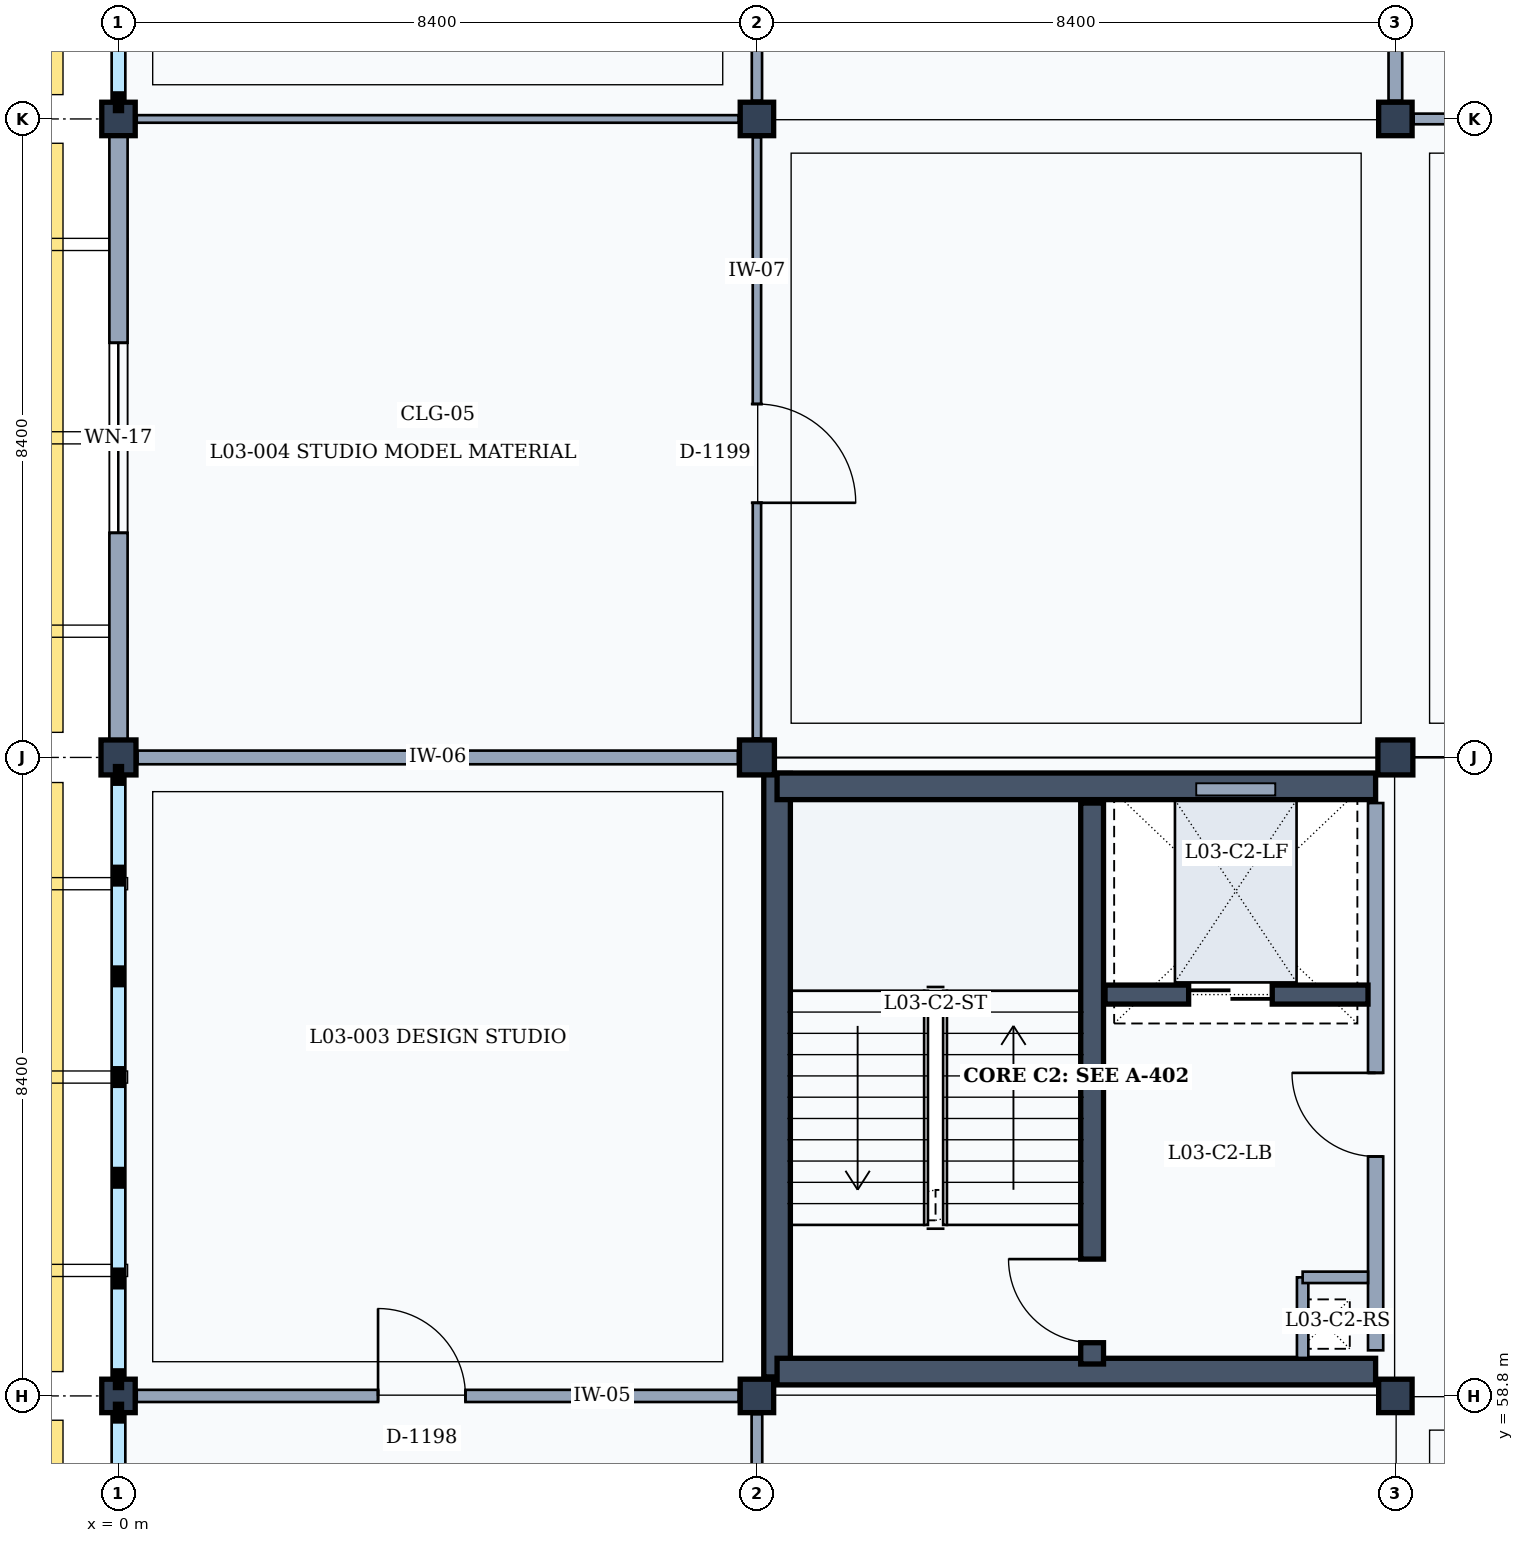
"""IFC4 building model, lengths in metres.
Left out: names, types, materials, properties, quantities, classifications, styles, units other than length and angle.
Written with IfcOpenShell. Run it as: python <this file> out.ifc"""

import sys

from ifc_helpers import new_model, si_unit, direction, frame, frame_2d, origin, origin_2d, place, context, subcontext, project, spatial, rectangle, extrude, element, fill, save


model = new_model("IFC4")
c1 = context("Model", 3, precision=1e-05, world=origin(), true_north=direction((0.0, 1.0)))
c2 = subcontext(c1, "Body", "Model", "MODEL_VIEW")
j1 = project(units=[si_unit("LENGTHUNIT", "METRE"), si_unit("PLANEANGLEUNIT", "RADIAN")], contexts=[c1])
p1 = place(None, origin())
s1 = spatial("IfcSite", under=j1, at=p1, CompositionType="ELEMENT")
p2 = place(p1, origin())
s2 = spatial("IfcBuilding", under=s1, at=p2, CompositionType="ELEMENT")
p3 = place(p2, frame((0.0, 0.0, 13.8)))
s3 = spatial("IfcBuildingStorey", under=s2, at=p3, CompositionType="ELEMENT", Elevation=13.8)
p4 = place(p3, frame((0.0, 58.8, 0.0), z_axis=(0.0, 0.0, 1.0), x_axis=(1.0, 0.0, 0.0)))
e1 = element("IfcColumn", 1, at=p4, inside=s3, PredefinedType="COLUMN", context=c2, shape_type="SweptSolid", body=[
    extrude(rectangle(XDim=0.44, YDim=0.44, at=origin_2d()), origin(), (0.0, 0.0, 1.0), 4.2),
])
p5 = place(p3, frame((0.0, 67.2, 0.0), z_axis=(0.0, 0.0, 1.0), x_axis=(1.0, 0.0, 0.0)))
e2 = element("IfcColumn", 2, at=p5, inside=s3, PredefinedType="COLUMN", context=c2, shape_type="SweptSolid", body=[
    extrude(rectangle(XDim=0.46, YDim=0.46, at=origin_2d()), origin(), (0.0, 0.0, 1.0), 4.2),
])
for number, where, z_axis, x_axis in (
    (3, (0.0, 75.6, 0.0), (0.0, 0.0, 1.0), (1.0, 0.0, 0.0)),
    (4, (8.4, 58.8, 0.0), (0.0, 0.0, 1.0), (1.0, 0.0, 0.0)),
):
    element("IfcColumn", number, at=place(p3, frame(where, z_axis=z_axis, x_axis=x_axis)), inside=s3, PredefinedType="COLUMN", context=c2, shape_type="SweptSolid", body=[
        extrude(rectangle(XDim=0.44, YDim=0.44, at=origin_2d()), origin(), (0.0, 0.0, 1.0), 4.2),
    ])
p6 = place(p3, frame((8.4, 67.2, 0.0), z_axis=(0.0, 0.0, 1.0), x_axis=(1.0, 0.0, 0.0)))
e5 = element("IfcColumn", 5, at=p6, inside=s3, PredefinedType="COLUMN", context=c2, shape_type="SweptSolid", body=[
    extrude(rectangle(XDim=0.46, YDim=0.46, at=origin_2d()), origin(), (0.0, 0.0, 1.0), 4.2),
])
for number, where, z_axis, x_axis in (
    (6, (8.4, 75.6, 0.0), (0.0, 0.0, 1.0), (1.0, 0.0, 0.0)),
    (7, (16.8, 58.8, 0.0), (0.0, 0.0, 1.0), (1.0, 0.0, 0.0)),
):
    element("IfcColumn", number, at=place(p3, frame(where, z_axis=z_axis, x_axis=x_axis)), inside=s3, PredefinedType="COLUMN", context=c2, shape_type="SweptSolid", body=[
        extrude(rectangle(XDim=0.44, YDim=0.44, at=origin_2d()), origin(), (0.0, 0.0, 1.0), 4.2),
    ])
p7 = place(p3, frame((16.8, 67.2, 0.0), z_axis=(0.0, 0.0, 1.0), x_axis=(1.0, 0.0, 0.0)))
e8 = element("IfcColumn", 8, at=p7, inside=s3, PredefinedType="COLUMN", context=c2, shape_type="SweptSolid", body=[
    extrude(rectangle(XDim=0.46, YDim=0.46, at=origin_2d()), origin(), (0.0, 0.0, 1.0), 4.2),
])
p8 = place(p3, frame((16.8, 75.6, 0.0), z_axis=(0.0, 0.0, 1.0), x_axis=(1.0, 0.0, 0.0)))
e9 = element("IfcColumn", 9, at=p8, inside=s3, PredefinedType="COLUMN", context=c2, shape_type="SweptSolid", body=[
    extrude(rectangle(XDim=0.44, YDim=0.44, at=origin_2d()), origin(), (0.0, 0.0, 1.0), 4.2),
])
p9 = place(p3, frame((0.0, 67.43, 0.0), z_axis=(0.0, 0.0, 1.0), x_axis=(0.0, 1.0, 0.0)))
e10 = element("IfcWall", 10, at=p9, inside=s3, PredefinedType="SOLIDWALL", context=c2, shape_type="SweptSolid", body=[
    extrude(rectangle(XDim=7.95, YDim=0.24, at=frame_2d((3.975, 0.0))), origin(), (0.0, 0.0, 1.0), 3.36),
])
p10 = place(p9, frame((2.725, 0.0, 0.9)))
e11 = element("IfcOpeningElement", 11, at=p10, cuts=e10, PredefinedType="OPENING", context=c2, shape_type="SweptSolid", body=[
    extrude(rectangle(XDim=2.5, YDim=2.0, at=frame_2d((1.25, 1.0))), frame((0.0, 0.13, 0.0), z_axis=(0.0, -1.0, 0.0), x_axis=(1.0, 0.0, 0.0)), (0.0, 0.0, 1.0), 0.26),
])
p11 = place(p3, frame((8.665, 59.05, 0.0), z_axis=(0.0, 0.0, 1.0), x_axis=(0.0, 1.0, 0.0)))
e12 = element("IfcWall", 12, at=p11, inside=s3, PredefinedType="SHEAR", context=c2, shape_type="SweptSolid", body=[
    extrude(rectangle(XDim=7.94, YDim=0.35, at=frame_2d((3.97, 0.0))), origin(), (0.0, 0.0, 1.0), 3.98),
])
p12 = place(p3, frame((8.665, 66.82, 0.0), z_axis=(0.0, 0.0, 1.0), x_axis=(1.0, 0.0, 0.0)))
e13 = element("IfcWall", 13, at=p12, inside=s3, PredefinedType="SHEAR", context=c2, shape_type="SweptSolid", body=[
    extrude(rectangle(XDim=7.875, YDim=0.35, at=frame_2d((3.938, 0.0))), origin(), (0.0, 0.0, 1.0), 3.98),
])
p13 = place(p3, frame((16.54, 66.6, 0.0), z_axis=(0.0, 0.0, 1.0), x_axis=(0.0, -1.0, 0.0)))
e14 = element("IfcWall", 14, at=p13, inside=s3, PredefinedType="PARTITIONING", context=c2, shape_type="SweptSolid", body=[
    extrude(rectangle(XDim=7.2, YDim=0.2, at=frame_2d((3.6, 0.0))), origin(), (0.0, 0.0, 1.0), 3.32),
])
p14 = place(p13, frame((3.55, 0.0, 0.0)))
e15 = element("IfcOpeningElement", 15, at=p14, cuts=e14, PredefinedType="OPENING", context=c2, shape_type="SweptSolid", body=[
    extrude(rectangle(XDim=1.1, YDim=2.15, at=frame_2d((0.55, 1.075))), frame((0.0, 0.11, 0.0), z_axis=(0.0, -1.0, 0.0), x_axis=(1.0, 0.0, 0.0)), (0.0, 0.0, 1.0), 0.22),
])
p15 = place(p3, frame((16.54, 59.12, 0.0), z_axis=(0.0, 0.0, 1.0), x_axis=(-1.0, 0.0, 0.0)))
e16 = element("IfcWall", 16, at=p15, inside=s3, PredefinedType="SHEAR", context=c2, shape_type="SweptSolid", body=[
    extrude(rectangle(XDim=7.875, YDim=0.35, at=frame_2d((3.938, 0.0))), origin(), (0.0, 0.0, 1.0), 3.98),
])
p16 = place(p3, frame((12.81, 59.22, 0.0), z_axis=(0.0, 0.0, 1.0), x_axis=(0.0, 1.0, 0.0)))
e17 = element("IfcWall", 17, at=p16, inside=s3, PredefinedType="SHEAR", context=c2, shape_type="SweptSolid", body=[
    extrude(rectangle(XDim=7.38, YDim=0.3, at=frame_2d((3.69, 0.0))), origin(), (0.0, 0.0, 1.0), 3.98),
])
p17 = place(p16, frame((0.28, 0.0, 0.0)))
e18 = element("IfcOpeningElement", 18, at=p17, cuts=e17, PredefinedType="OPENING", context=c2, shape_type="SweptSolid", body=[
    extrude(rectangle(XDim=1.1, YDim=2.15, at=frame_2d((0.55, 1.075))), frame((0.0, 0.16, 0.0), z_axis=(0.0, -1.0, 0.0), x_axis=(1.0, 0.0, 0.0)), (0.0, 0.0, 1.0), 0.32),
])
p18 = place(p3, frame((15.58, 60.36, 0.0), z_axis=(0.0, 0.0, 1.0), x_axis=(0.0, -1.0, 0.0)))
e19 = element("IfcWall", 19, at=p18, inside=s3, PredefinedType="PARTITIONING", context=c2, shape_type="SweptSolid", body=[
    extrude(rectangle(XDim=1.06, YDim=0.15, at=frame_2d((0.53, 0.0))), origin(), (0.0, 0.0, 1.0), 3.32),
])
p19 = place(p3, frame((15.58, 60.36, 0.0), z_axis=(0.0, 0.0, 1.0), x_axis=(1.0, 0.0, 0.0)))
e20 = element("IfcWall", 20, at=p19, inside=s3, PredefinedType="PARTITIONING", context=c2, shape_type="SweptSolid", body=[
    extrude(rectangle(XDim=0.86, YDim=0.15, at=frame_2d((0.43, 0.0))), origin(), (0.0, 0.0, 1.0), 3.32),
])
p20 = place(p3, frame((12.98, 64.08, 0.0), z_axis=(0.0, 0.0, 1.0), x_axis=(1.0, 0.0, 0.0)))
e21 = element("IfcWall", 21, at=p20, inside=s3, PredefinedType="SHEAR", context=c2, shape_type="SweptSolid", body=[
    extrude(rectangle(XDim=3.46, YDim=0.25, at=frame_2d((1.73, 0.0))), origin(), (0.0, 0.0, 1.0), 3.98),
])
p21 = place(p20, frame((1.1, 0.0, 0.0)))
e22 = element("IfcOpeningElement", 22, at=p21, cuts=e21, PredefinedType="OPENING", context=c2, shape_type="SweptSolid", body=[
    extrude(rectangle(XDim=1.1, YDim=2.15, at=frame_2d((0.55, 1.075))), frame((0.0, 0.135, 0.0), z_axis=(0.0, -1.0, 0.0), x_axis=(1.0, 0.0, 0.0)), (0.0, 0.0, 1.0), 0.27),
])
p22 = place(p3, frame((8.4, 50.65, 0.0), z_axis=(0.0, 0.0, 1.0), x_axis=(0.0, 1.0, 0.0)))
e23 = element("IfcWall", 23, at=p22, inside=s3, PredefinedType="PARTITIONING", context=c2, shape_type="SweptSolid", body=[
    extrude(rectangle(XDim=7.91, YDim=0.14, at=frame_2d((3.955, 0.0))), origin(), (0.0, 0.0, 1.0), 3.32),
])
p23 = place(p22, frame((3.225, 0.0, 0.0)))
e24 = element("IfcOpeningElement", 24, at=p23, cuts=e23, PredefinedType="OPENING", context=c2, shape_type="SweptSolid", body=[
    extrude(rectangle(XDim=1.05, YDim=2.2, at=frame_2d((0.525, 1.1))), frame((0.0, 0.08, 0.0), z_axis=(0.0, -1.0, 0.0), x_axis=(1.0, 0.0, 0.0)), (0.0, 0.0, 1.0), 0.16),
])
p24 = place(p3, frame((0.24, 58.8, 0.0), z_axis=(0.0, 0.0, 1.0), x_axis=(1.0, 0.0, 0.0)))
e25 = element("IfcWall", 25, at=p24, inside=s3, PredefinedType="PARTITIONING", context=c2, shape_type="SweptSolid", body=[
    extrude(rectangle(XDim=7.92, YDim=0.16, at=frame_2d((3.96, 0.0))), origin(), (0.0, 0.0, 1.0), 3.32),
])
p25 = place(p24, frame((3.175, 0.0, 0.0)))
e26 = element("IfcOpeningElement", 26, at=p25, cuts=e25, PredefinedType="OPENING", context=c2, shape_type="SweptSolid", body=[
    extrude(rectangle(XDim=1.15, YDim=2.25, at=frame_2d((0.575, 1.125))), frame((0.0, 0.09, 0.0), z_axis=(0.0, -1.0, 0.0), x_axis=(1.0, 0.0, 0.0)), (0.0, 0.0, 1.0), 0.18),
])
p26 = place(p3, frame((0.25, 67.2, 0.0), z_axis=(0.0, 0.0, 1.0), x_axis=(1.0, 0.0, 0.0)))
e27 = element("IfcWall", 27, at=p26, inside=s3, PredefinedType="PARTITIONING", context=c2, shape_type="SweptSolid", body=[
    extrude(rectangle(XDim=7.9, YDim=0.18, at=frame_2d((3.95, 0.0))), origin(), (0.0, 0.0, 1.0), 3.32),
])
p27 = place(p3, frame((8.4, 67.45, 0.0), z_axis=(0.0, 0.0, 1.0), x_axis=(0.0, 1.0, 0.0)))
e28 = element("IfcWall", 28, at=p27, inside=s3, PredefinedType="PARTITIONING", context=c2, shape_type="SweptSolid", body=[
    extrude(rectangle(XDim=7.91, YDim=0.11, at=frame_2d((3.955, 0.0))), origin(), (0.0, 0.0, 1.0), 3.32),
])
p28 = place(p27, frame((3.1, 0.0, 0.0)))
e29 = element("IfcOpeningElement", 29, at=p28, cuts=e28, PredefinedType="OPENING", context=c2, shape_type="SweptSolid", body=[
    extrude(rectangle(XDim=1.3, YDim=2.2, at=frame_2d((0.65, 1.1))), frame((0.0, 0.065, 0.0), z_axis=(0.0, -1.0, 0.0), x_axis=(1.0, 0.0, 0.0)), (0.0, 0.0, 1.0), 0.13),
])
p29 = place(p3, frame((0.24, 75.6, 0.0), z_axis=(0.0, 0.0, 1.0), x_axis=(1.0, 0.0, 0.0)))
e30 = element("IfcWall", 30, at=p29, inside=s3, PredefinedType="MOVABLE", context=c2, shape_type="SweptSolid", body=[
    extrude(rectangle(XDim=7.92, YDim=0.1, at=frame_2d((3.96, 0.0))), origin(), (0.0, 0.0, 1.0), 3.32),
])
p30 = place(p3, frame((8.4, 75.84, 0.0), z_axis=(0.0, 0.0, 1.0), x_axis=(0.0, 1.0, 0.0)))
e31 = element("IfcWall", 31, at=p30, inside=s3, PredefinedType="PARTITIONING", context=c2, shape_type="SweptSolid", body=[
    extrude(rectangle(XDim=7.91, YDim=0.135, at=frame_2d((3.955, 0.0))), origin(), (0.0, 0.0, 1.0), 3.32),
])
p31 = place(p30, frame((2.975, 0.0, 0.0)))
e32 = element("IfcOpeningElement", 32, at=p31, cuts=e31, PredefinedType="OPENING", context=c2, shape_type="SweptSolid", body=[
    extrude(rectangle(XDim=1.55, YDim=2.35, at=frame_2d((0.775, 1.175))), frame((0.0, 0.077, 0.0), z_axis=(0.0, -1.0, 0.0), x_axis=(1.0, 0.0, 0.0)), (0.0, 0.0, 1.0), 0.155),
])
p32 = place(p3, frame((16.8, 75.84, 0.0), z_axis=(0.0, 0.0, 1.0), x_axis=(0.0, 1.0, 0.0)))
e33 = element("IfcWall", 33, at=p32, inside=s3, PredefinedType="PARTITIONING", context=c2, shape_type="SweptSolid", body=[
    extrude(rectangle(XDim=7.91, YDim=0.18, at=frame_2d((3.955, 0.0))), origin(), (0.0, 0.0, 1.0), 3.32),
])
p33 = place(p32, frame((2.85, 0.0, 0.0)))
e34 = element("IfcOpeningElement", 34, at=p33, cuts=e33, PredefinedType="OPENING", context=c2, shape_type="SweptSolid", body=[
    extrude(rectangle(XDim=1.8, YDim=2.3, at=frame_2d((0.9, 1.15))), frame((0.0, 0.1, 0.0), z_axis=(0.0, -1.0, 0.0), x_axis=(1.0, 0.0, 0.0)), (0.0, 0.0, 1.0), 0.2),
])
p34 = place(p3, frame((17.04, 75.6, 0.0), z_axis=(0.0, 0.0, 1.0), x_axis=(1.0, 0.0, 0.0)))
e35 = element("IfcWall", 35, at=p34, inside=s3, PredefinedType="PARTITIONING", context=c2, shape_type="SweptSolid", body=[
    extrude(rectangle(XDim=7.92, YDim=0.14, at=frame_2d((3.96, 0.0))), origin(), (0.0, 0.0, 1.0), 3.32),
])
p35 = place(p10, origin())
e36 = element("IfcWindow", 36, at=p35, inside=s3, PartitioningType="SINGLE_PANEL", PredefinedType="WINDOW", context=c2, shape_type="SweptSolid", body=[
    extrude(rectangle(XDim=2.5, YDim=2.0, at=frame_2d((1.25, 1.0))), frame((0.0, 0.03, 0.0), z_axis=(0.0, -1.0, 0.0), x_axis=(1.0, 0.0, 0.0)), (0.0, 0.0, 1.0), 0.06),
])
fill(e11, e36)
p36 = place(p14, frame((1.1, 0.0, 0.0), z_axis=(0.0, 0.0, 1.0), x_axis=(-1.0, 0.0, 0.0)))
e37 = element("IfcDoor", 37, at=p36, inside=s3, OperationType="SINGLE_SWING_RIGHT", PredefinedType="DOOR", context=c2, shape_type="SweptSolid", body=[
    extrude(rectangle(XDim=1.1, YDim=2.15, at=frame_2d((0.55, 1.075))), frame((0.0, 0.025, 0.0), z_axis=(0.0, -1.0, 0.0), x_axis=(1.0, 0.0, 0.0)), (0.0, 0.0, 1.0), 0.05),
])
fill(e15, e37)
p37 = place(p17, origin())
e38 = element("IfcDoor", 38, at=p37, inside=s3, OperationType="SINGLE_SWING_RIGHT", PredefinedType="DOOR", context=c2, shape_type="SweptSolid", body=[
    extrude(rectangle(XDim=1.1, YDim=2.15, at=frame_2d((0.55, 1.075))), frame((0.0, 0.025, 0.0), z_axis=(0.0, -1.0, 0.0), x_axis=(1.0, 0.0, 0.0)), (0.0, 0.0, 1.0), 0.05),
])
fill(e18, e38)
p38 = place(p21, origin())
e39 = element("IfcDoor", 39, at=p38, inside=s3, OperationType="DOUBLE_DOOR_SLIDING", PredefinedType="DOOR", context=c2, shape_type="SweptSolid", body=[
    extrude(rectangle(XDim=1.1, YDim=2.15, at=frame_2d((0.55, 1.075))), frame((0.0, 0.025, 0.0), z_axis=(0.0, -1.0, 0.0), x_axis=(1.0, 0.0, 0.0)), (0.0, 0.0, 1.0), 0.05),
])
fill(e22, e39)
p39 = place(p25, origin())
e40 = element("IfcDoor", 40, at=p39, inside=s3, OperationType="SINGLE_SWING_LEFT", PredefinedType="DOOR", context=c2, shape_type="SweptSolid", body=[
    extrude(rectangle(XDim=1.15, YDim=2.25, at=frame_2d((0.575, 1.125))), frame((0.0, 0.025, 0.0), z_axis=(0.0, -1.0, 0.0), x_axis=(1.0, 0.0, 0.0)), (0.0, 0.0, 1.0), 0.05),
])
fill(e26, e40)
p40 = place(p28, frame((1.3, 0.0, 0.0), z_axis=(0.0, 0.0, 1.0), x_axis=(-1.0, 0.0, 0.0)))
e41 = element("IfcDoor", 41, at=p40, inside=s3, OperationType="SINGLE_SWING_RIGHT", PredefinedType="DOOR", context=c2, shape_type="SweptSolid", body=[
    extrude(rectangle(XDim=1.3, YDim=2.2, at=frame_2d((0.65, 1.1))), frame((0.0, 0.025, 0.0), z_axis=(0.0, -1.0, 0.0), x_axis=(1.0, 0.0, 0.0)), (0.0, 0.0, 1.0), 0.05),
])
fill(e29, e41)
save(model, sys.argv[1])
